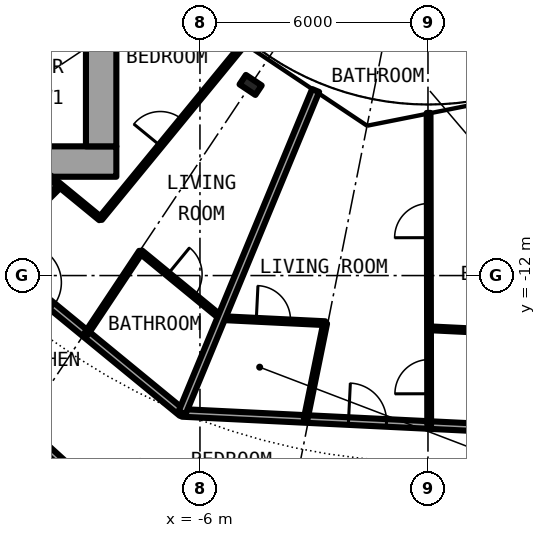
"""IFC4 building model, lengths in metres.
Left out: names, types, materials, properties, quantities, classifications, styles, units other than length and angle.
Written with IfcOpenShell. Run it as: python <this file> out.ifc"""

import sys

from ifc_helpers import new_model, si_unit, direction, frame, frame_2d, origin, origin_2d, place, context, subcontext, project, spatial, rectangle, i_section, extrude, element, fill, save


model = new_model("IFC4")
c1 = context("Model", 3, precision=1e-05, world=origin(), true_north=direction((0.0, 1.0)))
c2 = subcontext(c1, "Body", "Model", "MODEL_VIEW")
j1 = project(units=[si_unit("LENGTHUNIT", "METRE"), si_unit("PLANEANGLEUNIT", "RADIAN")], contexts=[c1])
p1 = place(None, origin())
s1 = spatial("IfcSite", under=j1, at=p1, CompositionType="ELEMENT")
p2 = place(p1, origin())
s2 = spatial("IfcBuilding", under=s1, at=p2, CompositionType="ELEMENT")
p3 = place(p2, frame((0.0, 0.0, 41.1)))
s3 = spatial("IfcBuildingStorey", under=s2, at=p3, CompositionType="ELEMENT", Elevation=41.1)
p4 = place(p3, frame((-4.667, -6.984, 0.0), z_axis=(0.0, 0.0, 1.0), x_axis=(-0.55557023302, -0.831469612303, 0.0)))
e1 = element("IfcColumn", 1, at=p4, inside=s3, PredefinedType="COLUMN", context=c2, shape_type="SweptSolid", body=[
    extrude(i_section(OverallWidth=0.3, OverallDepth=0.5, WebThickness=0.014, FlangeThickness=0.028, FilletRadius=0.027, at=origin_2d()), origin(), (0.0, 0.0, 1.0), 3.05),
])
p5 = place(p3, frame((-22.4, -9.0, 0.0), z_axis=(0.0, 0.0, 1.0), x_axis=(1.0, 0.0, 0.0)))
e2 = element("IfcWall", 2, at=p5, inside=s3, PredefinedType="SHEAR", context=c2, shape_type="SweptSolid", body=[
    extrude(rectangle(XDim=14.2, YDim=0.8, at=frame_2d((7.1, 0.0))), origin(), (0.0, 0.0, 1.0), 3.05),
])
p6 = place(p5, frame((1.325, 0.0, 0.0)))
e3 = element("IfcOpeningElement", 3, at=p6, cuts=e2, PredefinedType="OPENING", context=c2, shape_type="SweptSolid", body=[
    extrude(rectangle(XDim=1.2, YDim=2.3, at=frame_2d((0.6, 1.15))), frame((0.0, 0.41, 0.0), z_axis=(0.0, -1.0, 0.0), x_axis=(1.0, 0.0, 0.0)), (0.0, 0.0, 1.0), 0.82),
])
p7 = place(p3, frame((-8.6, 8.6, 0.0), z_axis=(0.0, 0.0, 1.0), x_axis=(0.0, -1.0, 0.0)))
e4 = element("IfcWall", 4, at=p7, inside=s3, PredefinedType="SHEAR", context=c2, shape_type="SweptSolid", body=[
    extrude(rectangle(XDim=17.2, YDim=0.8, at=frame_2d((8.6, 0.0))), origin(), (0.0, 0.0, 1.0), 3.05),
])
p8 = place(p7, frame((7.4, 0.0, 0.1)))
e5 = element("IfcOpeningElement", 5, at=p8, cuts=e4, PredefinedType="OPENING", context=c2, shape_type="SweptSolid", body=[
    extrude(rectangle(XDim=2.4, YDim=2.2, at=frame_2d((1.2, 1.1))), frame((0.0, 0.41, 0.0), z_axis=(0.0, -1.0, 0.0), x_axis=(1.0, 0.0, 0.0)), (0.0, 0.0, 1.0), 0.82),
])
p9 = place(p3, frame((-16.179, -10.994, 0.0), z_axis=(0.0, 0.0, 1.0), x_axis=(0.740659568799, -0.671880497668, 0.0)))
e6 = element("IfcWall", 6, at=p9, inside=s3, PredefinedType="PARTITIONING", context=c2, shape_type="SweptSolid", body=[
    extrude(rectangle(XDim=9.36, YDim=0.2, at=frame_2d((4.68, 0.0))), origin(), (0.0, 0.0, 1.0), 2.38),
])
p10 = place(p9, frame((4.105, 0.0, 0.0)))
e7 = element("IfcOpeningElement", 7, at=p10, cuts=e6, PredefinedType="OPENING", context=c2, shape_type="SweptSolid", body=[
    extrude(rectangle(XDim=1.0, YDim=2.3, at=frame_2d((0.5, 1.15))), frame((0.0, 0.11, 0.0), z_axis=(0.0, -1.0, 0.0), x_axis=(1.0, 0.0, 0.0)), (0.0, 0.0, 1.0), 0.22),
])
p11 = place(p3, frame((-14.038, -9.402, 0.0), z_axis=(0.0, 0.0, 1.0), x_axis=(0.773084654695, -0.634302858794, 0.0)))
e8 = element("IfcWall", 8, at=p11, inside=s3, PredefinedType="PARTITIONING", context=c2, shape_type="SweptSolid", body=[
    extrude(rectangle(XDim=9.793, YDim=0.2, at=frame_2d((4.896, 0.0))), origin(), (0.0, 0.0, 1.0), 2.7),
])
p12 = place(p11, frame((4.387, 0.0, 0.0)))
e9 = element("IfcOpeningElement", 9, at=p12, cuts=e8, PredefinedType="OPENING", context=c2, shape_type="SweptSolid", body=[
    extrude(rectangle(XDim=1.0, YDim=2.3, at=frame_2d((0.5, 1.15))), frame((0.0, 0.11, 0.0), z_axis=(0.0, -1.0, 0.0), x_axis=(1.0, 0.0, 0.0)), (0.0, 0.0, 1.0), 0.22),
])
p13 = place(p3, frame((-6.469, -15.614, 0.0), z_axis=(0.0, 0.0, 1.0), x_axis=(0.998798520108, -0.049005267363, 0.0)))
e10 = element("IfcWall", 10, at=p13, inside=s3, PredefinedType="PARTITIONING", context=c2, shape_type="SweptSolid", body=[
    extrude(rectangle(XDim=11.389, YDim=0.2, at=frame_2d((5.694, 0.0))), origin(), (0.0, 0.0, 1.0), 2.7),
])
p14 = place(p13, frame((4.383, 0.0, 0.0)))
e11 = element("IfcOpeningElement", 11, at=p14, cuts=e10, PredefinedType="OPENING", context=c2, shape_type="SweptSolid", body=[
    extrude(rectangle(XDim=1.0, YDim=2.3, at=frame_2d((0.5, 1.15))), frame((0.0, 0.11, 0.0), z_axis=(0.0, -1.0, 0.0), x_axis=(1.0, 0.0, 0.0)), (0.0, 0.0, 1.0), 0.22),
])
p15 = place(p3, frame((-9.971, -9.396, 0.0), z_axis=(0.0, 0.0, 1.0), x_axis=(0.77321028337, -0.634149712363, 0.0)))
e12 = element("IfcWall", 12, at=p15, inside=s3, PredefinedType="PARTITIONING", context=c2, shape_type="SweptSolid", body=[
    extrude(rectangle(XDim=1.749, YDim=0.1, at=frame_2d((0.874, 0.0))), origin(), (0.0, 0.0, 1.0), 2.7),
])
p16 = place(p3, frame((-7.558, -11.376, 0.0), z_axis=(0.0, 0.0, 1.0), x_axis=(0.773049907698, -0.634345205868, 0.0)))
e13 = element("IfcWall", 13, at=p16, inside=s3, PredefinedType="PARTITIONING", context=c2, shape_type="SweptSolid", body=[
    extrude(rectangle(XDim=2.748, YDim=0.1, at=frame_2d((1.374, 0.0))), origin(), (0.0, 0.0, 1.0), 2.7),
])
p17 = place(p16, frame((0.924, 0.0, 0.0)))
e14 = element("IfcOpeningElement", 14, at=p17, cuts=e13, PredefinedType="OPENING", context=c2, shape_type="SweptSolid", body=[
    extrude(rectangle(XDim=0.9, YDim=2.3, at=frame_2d((0.45, 1.15))), frame((0.0, 0.06, 0.0), z_axis=(0.0, -1.0, 0.0), x_axis=(1.0, 0.0, 0.0)), (0.0, 0.0, 1.0), 0.12),
])
p18 = place(p3, frame((-5.434, -13.119, 0.0), z_axis=(0.0, 0.0, 1.0), x_axis=(0.998796928508, -0.049037695739, 0.0)))
e15 = element("IfcWall", 15, at=p18, inside=s3, PredefinedType="PARTITIONING", context=c2, shape_type="SweptSolid", body=[
    extrude(rectangle(XDim=2.733, YDim=0.1, at=frame_2d((1.367, 0.0))), origin(), (0.0, 0.0, 1.0), 2.7),
])
p19 = place(p18, frame((0.917, 0.0, 0.0)))
e16 = element("IfcOpeningElement", 16, at=p19, cuts=e15, PredefinedType="OPENING", context=c2, shape_type="SweptSolid", body=[
    extrude(rectangle(XDim=0.9, YDim=2.3, at=frame_2d((0.45, 1.15))), frame((0.0, 0.06, 0.0), z_axis=(0.0, -1.0, 0.0), x_axis=(1.0, 0.0, 0.0)), (0.0, 0.0, 1.0), 0.12),
])
p20 = place(p3, frame((0.03, -13.387, 0.0), z_axis=(0.0, 0.0, 1.0), x_axis=(0.998798386358, -0.049007993321, 0.0)))
e17 = element("IfcWall", 17, at=p20, inside=s3, PredefinedType="PARTITIONING", context=c2, shape_type="SweptSolid", body=[
    extrude(rectangle(XDim=4.1, YDim=0.1, at=frame_2d((2.05, 0.0))), origin(), (0.0, 0.0, 1.0), 2.7),
])
p21 = place(p3, frame((-11.524, -11.464, 0.0), z_axis=(0.0, 0.0, 1.0), x_axis=(0.708796844581, 0.705412668665, 0.0)))
e18 = element("IfcWall", 18, at=p21, inside=s3, PredefinedType="PARTITIONING", context=c2, shape_type="SweptSolid", body=[
    extrude(rectangle(XDim=2.597, YDim=0.1, at=frame_2d((1.299, 0.0))), origin(), (0.0, 0.0, 1.0), 2.7),
])
p22 = place(p21, frame((0.849, 0.0, 0.0)))
e19 = element("IfcOpeningElement", 19, at=p22, cuts=e18, PredefinedType="OPENING", context=c2, shape_type="SweptSolid", body=[
    extrude(rectangle(XDim=0.9, YDim=2.3, at=frame_2d((0.45, 1.15))), frame((0.0, 0.06, 0.0), z_axis=(0.0, -1.0, 0.0), x_axis=(1.0, 0.0, 0.0)), (0.0, 0.0, 1.0), 0.12),
])
p23 = place(p3, frame((-8.996, -13.539, 0.0), z_axis=(0.0, 0.0, 1.0), x_axis=(0.553615197403, 0.83277260594, 0.0)))
e20 = element("IfcWall", 20, at=p23, inside=s3, PredefinedType="PARTITIONING", context=c2, shape_type="SweptSolid", body=[
    extrude(rectangle(XDim=2.597, YDim=0.1, at=frame_2d((1.299, 0.0))), origin(), (0.0, 0.0, 1.0), 2.7),
])
p24 = place(p3, frame((-8.62, -10.504, 0.0), z_axis=(0.0, 0.0, 1.0), x_axis=(0.634358693064, 0.773038840249, 0.0)))
e21 = element("IfcWall", 21, at=p24, inside=s3, PredefinedType="PARTITIONING", context=c2, shape_type="SweptSolid", body=[
    extrude(rectangle(XDim=5.868, YDim=0.1, at=frame_2d((2.934, 0.0))), origin(), (0.0, 0.0, 1.0), 2.7),
])
p25 = place(p24, frame((2.484, 0.0, 0.0)))
e22 = element("IfcOpeningElement", 22, at=p25, cuts=e21, PredefinedType="OPENING", context=c2, shape_type="SweptSolid", body=[
    extrude(rectangle(XDim=0.9, YDim=2.3, at=frame_2d((0.45, 1.15))), frame((0.0, 0.06, 0.0), z_axis=(0.0, -1.0, 0.0), x_axis=(1.0, 0.0, 0.0)), (0.0, 0.0, 1.0), 0.12),
])
p26 = place(p3, frame((-6.472, -15.612, 0.0), z_axis=(0.0, 0.0, 1.0), x_axis=(0.382956910161, 0.923766206873, 0.0)))
e23 = element("IfcWall", 23, at=p26, inside=s3, PredefinedType="PARTITIONING", context=c2, shape_type="SweptSolid", body=[
    extrude(rectangle(XDim=9.181, YDim=0.2, at=frame_2d((4.59, 0.0))), origin(), (0.0, 0.0, 1.0), 2.7),
])
p27 = place(p3, frame((-3.218, -15.773, 0.0), z_axis=(0.0, 0.0, 1.0), x_axis=(0.199820523641, 0.979832515449, 0.0)))
e24 = element("IfcWall", 24, at=p27, inside=s3, PredefinedType="PARTITIONING", context=c2, shape_type="SweptSolid", body=[
    extrude(rectangle(XDim=2.572, YDim=0.1, at=frame_2d((1.286, 0.0))), origin(), (0.0, 0.0, 1.0), 2.7),
])
p28 = place(p3, frame((0.032, -15.933, 0.0), z_axis=(0.0, 0.0, 1.0), x_axis=(-0.0019321625, 0.999998133372, 0.0)))
e25 = element("IfcWall", 25, at=p28, inside=s3, PredefinedType="PARTITIONING", context=c2, shape_type="SweptSolid", body=[
    extrude(rectangle(XDim=8.213, YDim=0.1, at=frame_2d((4.106, 0.0))), origin(), (0.0, 0.0, 1.0), 2.7),
])
p29 = place(p28, frame((0.823, 0.0, 0.0)))
e26 = element("IfcOpeningElement", 26, at=p29, cuts=e25, PredefinedType="OPENING", context=c2, shape_type="SweptSolid", body=[
    extrude(rectangle(XDim=0.9, YDim=2.3, at=frame_2d((0.45, 1.15))), frame((0.0, 0.06, 0.0), z_axis=(0.0, -1.0, 0.0), x_axis=(1.0, 0.0, 0.0)), (0.0, 0.0, 1.0), 0.12),
])
p30 = place(p28, frame((4.93, 0.0, 0.0)))
e27 = element("IfcOpeningElement", 27, at=p30, cuts=e25, PredefinedType="OPENING", context=c2, shape_type="SweptSolid", body=[
    extrude(rectangle(XDim=0.9, YDim=2.3, at=frame_2d((0.45, 1.15))), frame((0.0, 0.06, 0.0), z_axis=(0.0, -1.0, 0.0), x_axis=(1.0, 0.0, 0.0)), (0.0, 0.0, 1.0), 0.12),
])
p31 = place(p12, origin())
e28 = element("IfcDoor", 28, at=p31, inside=s3, OperationType="SINGLE_SWING_LEFT", PredefinedType="DOOR", context=c2, shape_type="SweptSolid", body=[
    extrude(rectangle(XDim=1.0, YDim=2.3, at=frame_2d((0.5, 1.15))), frame((0.0, 0.025, 0.0), z_axis=(0.0, -1.0, 0.0), x_axis=(1.0, 0.0, 0.0)), (0.0, 0.0, 1.0), 0.05),
])
fill(e9, e28)
p32 = place(p17, origin())
e29 = element("IfcDoor", 29, at=p32, inside=s3, OperationType="SINGLE_SWING_LEFT", PredefinedType="DOOR", context=c2, shape_type="SweptSolid", body=[
    extrude(rectangle(XDim=0.9, YDim=2.3, at=frame_2d((0.45, 1.15))), frame((0.0, 0.025, 0.0), z_axis=(0.0, -1.0, 0.0), x_axis=(1.0, 0.0, 0.0)), (0.0, 0.0, 1.0), 0.05),
])
fill(e14, e29)
p33 = place(p25, origin())
e30 = element("IfcDoor", 30, at=p33, inside=s3, OperationType="SINGLE_SWING_RIGHT", PredefinedType="DOOR", context=c2, shape_type="SweptSolid", body=[
    extrude(rectangle(XDim=0.9, YDim=2.3, at=frame_2d((0.45, 1.15))), frame((0.0, 0.025, 0.0), z_axis=(0.0, -1.0, 0.0), x_axis=(1.0, 0.0, 0.0)), (0.0, 0.0, 1.0), 0.05),
])
fill(e22, e30)
p34 = place(p14, origin())
e31 = element("IfcDoor", 31, at=p34, inside=s3, OperationType="SINGLE_SWING_LEFT", PredefinedType="DOOR", context=c2, shape_type="SweptSolid", body=[
    extrude(rectangle(XDim=1.0, YDim=2.3, at=frame_2d((0.5, 1.15))), frame((0.0, 0.025, 0.0), z_axis=(0.0, -1.0, 0.0), x_axis=(1.0, 0.0, 0.0)), (0.0, 0.0, 1.0), 0.05),
])
fill(e11, e31)
p35 = place(p19, origin())
e32 = element("IfcDoor", 32, at=p35, inside=s3, OperationType="SINGLE_SWING_LEFT", PredefinedType="DOOR", context=c2, shape_type="SweptSolid", body=[
    extrude(rectangle(XDim=0.9, YDim=2.3, at=frame_2d((0.45, 1.15))), frame((0.0, 0.025, 0.0), z_axis=(0.0, -1.0, 0.0), x_axis=(1.0, 0.0, 0.0)), (0.0, 0.0, 1.0), 0.05),
])
fill(e16, e32)
p36 = place(p29, origin())
e33 = element("IfcDoor", 33, at=p36, inside=s3, OperationType="SINGLE_SWING_LEFT", PredefinedType="DOOR", context=c2, shape_type="SweptSolid", body=[
    extrude(rectangle(XDim=0.9, YDim=2.3, at=frame_2d((0.45, 1.15))), frame((0.0, 0.025, 0.0), z_axis=(0.0, -1.0, 0.0), x_axis=(1.0, 0.0, 0.0)), (0.0, 0.0, 1.0), 0.05),
])
fill(e26, e33)
p37 = place(p30, origin())
e34 = element("IfcDoor", 34, at=p37, inside=s3, OperationType="SINGLE_SWING_RIGHT", PredefinedType="DOOR", context=c2, shape_type="SweptSolid", body=[
    extrude(rectangle(XDim=0.9, YDim=2.3, at=frame_2d((0.45, 1.15))), frame((0.0, 0.025, 0.0), z_axis=(0.0, -1.0, 0.0), x_axis=(1.0, 0.0, 0.0)), (0.0, 0.0, 1.0), 0.05),
])
fill(e27, e34)
save(model, sys.argv[1])
